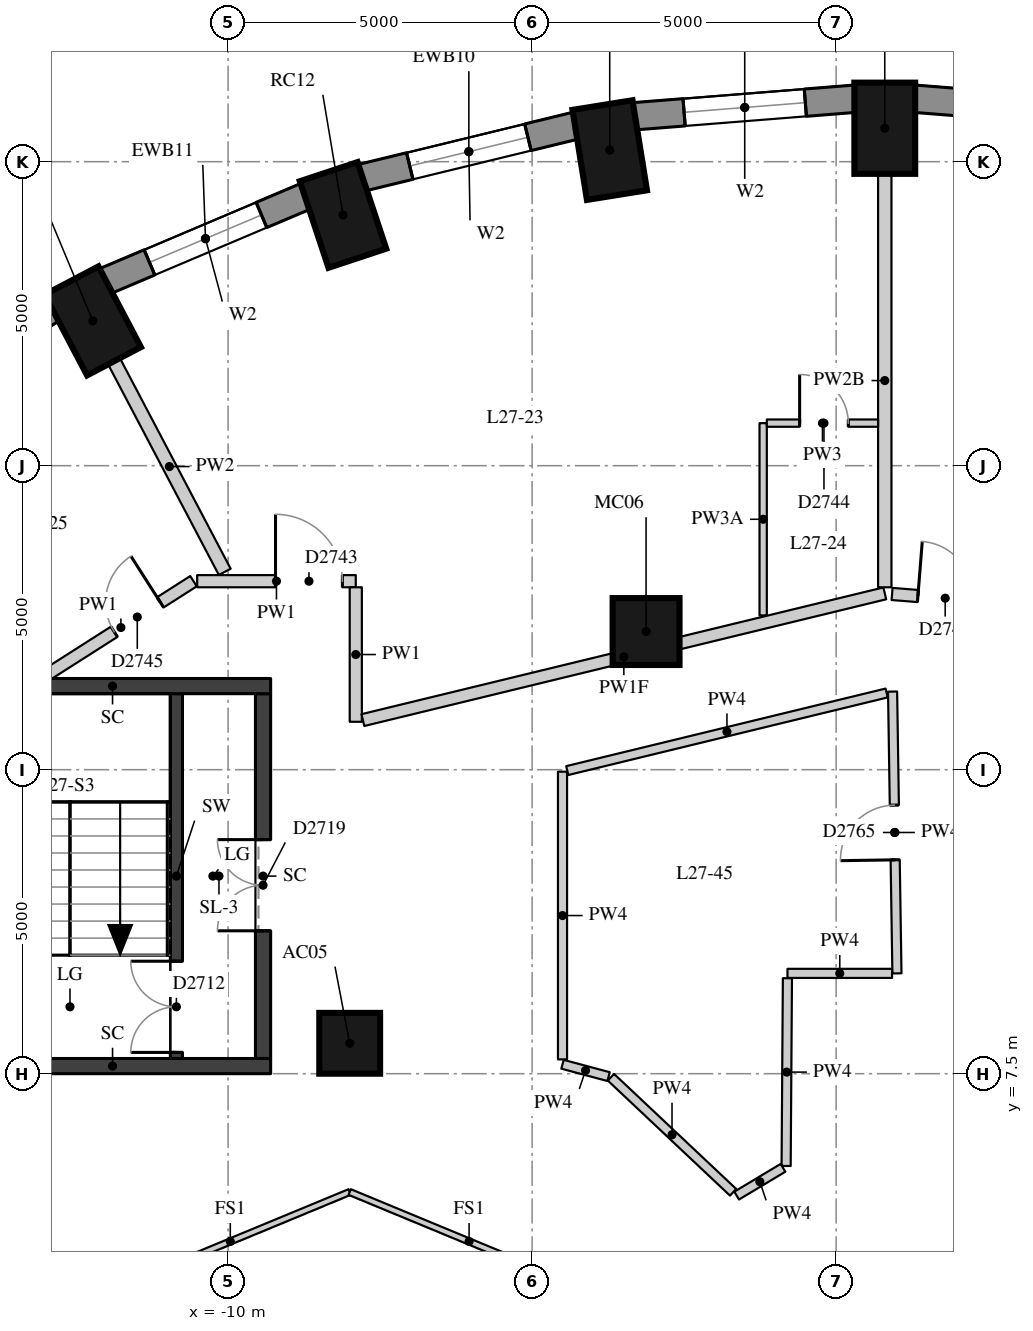
"""IFC4 building model, lengths in metres.
Left out: names, types, materials, properties, quantities, classifications, styles, units other than length and angle.
Written with IfcOpenShell. Run it as: python <this file> out.ifc"""

import sys

from ifc_helpers import new_model, si_unit, direction, frame, frame_2d, origin, origin_2d, place, context, subcontext, project, spatial, rectangle, extrude, element, fill, save


model = new_model("IFC4")
c1 = context("Model", 3, precision=1e-05, world=origin(), true_north=direction((0.0, 1.0)))
c2 = subcontext(c1, "Body", "Model", "MODEL_VIEW")
j1 = project(units=[si_unit("LENGTHUNIT", "METRE"), si_unit("PLANEANGLEUNIT", "RADIAN")], contexts=[c1])
p1 = place(None, origin())
s1 = spatial("IfcSite", under=j1, at=p1, CompositionType="ELEMENT")
p2 = place(p1, origin())
s2 = spatial("IfcBuilding", under=s1, at=p2, CompositionType="ELEMENT")
p3 = place(p2, frame((0.0, 0.0, 98.8)))
s3 = spatial("IfcBuildingStorey", under=s2, at=p3, CompositionType="ELEMENT", Elevation=98.8)
for number, where, z_axis, x_axis in (
    (1, (0.8, 23.05, 0.0), (0.0, 0.0, 1.0), (0.0, 1.0, 0.0)),
    (2, (-3.724, 22.691, 0.0), (0.0, 0.0, 1.0), (-0.159, 0.987, 0.0)),
    (3, (-8.11, 21.624, 0.0), (0.0, 0.0, 1.0), (-0.315, 0.949, 0.0)),
    (4, (-12.225, 19.882, 0.0), (0.0, 0.0, 1.0), (-0.465, 0.885, 0.0)),
):
    element("IfcColumn", number, at=place(p3, frame(where, z_axis=z_axis, x_axis=x_axis)), inside=s3, PredefinedType="COLUMN", context=c2, shape_type="SweptSolid", body=[
        extrude(rectangle(XDim=1.5, YDim=1.0, at=origin_2d()), origin(), (0.0, 0.0, 1.0), 3.3),
    ])
p4 = place(p3, frame((-8.0, 8.0, 0.0), z_axis=(0.0, 0.0, 1.0), x_axis=(1.0, 0.0, 0.0)))
e5 = element("IfcColumn", 5, at=p4, inside=s3, PredefinedType="COLUMN", context=c2, shape_type="SweptSolid", body=[
    extrude(rectangle(XDim=1.0, YDim=1.0, at=origin_2d()), origin(), (0.0, 0.0, 1.0), 3.3),
])
p5 = place(p3, frame((-3.126, 14.772, 0.0), z_axis=(0.0, 0.0, 1.0), x_axis=(1.0, 0.0, 0.0)))
e6 = element("IfcColumn", 6, at=p5, inside=s3, PredefinedType="COLUMN", context=c2, shape_type="SweptSolid", body=[
    extrude(rectangle(XDim=1.1, YDim=1.1, at=origin_2d()), origin(), (0.0, 0.0, 1.0), 3.3),
])
p6 = place(p3, frame((4.927, 23.247, 0.0), z_axis=(0.0, 0.0, 1.0), x_axis=(-0.996862216754, 0.079156306178, 0.0)))
e7 = element("IfcWall", 7, at=p6, inside=s3, PredefinedType="SOLIDWALL", context=c2, shape_type="SweptSolid", body=[
    extrude(rectangle(XDim=3.658, YDim=0.45, at=frame_2d((1.829, 0.0))), origin(), (0.0, 0.0, 1.0), 3.02),
])
p7 = place(p6, frame((0.829, 0.0, 0.4)))
e8 = element("IfcOpeningElement", 8, at=p7, cuts=e7, PredefinedType="OPENING", context=c2, shape_type="SweptSolid", body=[
    extrude(rectangle(XDim=2.0, YDim=1.75, at=frame_2d((1.0, 0.875))), frame((0.0, 0.235, 0.0), z_axis=(0.0, -1.0, 0.0), x_axis=(1.0, 0.0, 0.0)), (0.0, 0.0, 1.0), 0.47),
])
p8 = place(p3, frame((0.32, 23.536, 0.0), z_axis=(0.0, 0.0, 1.0), x_axis=(-0.996862216754, -0.079156306178, 0.0)))
e9 = element("IfcWall", 9, at=p8, inside=s3, PredefinedType="SOLIDWALL", context=c2, shape_type="SweptSolid", body=[
    extrude(rectangle(XDim=3.658, YDim=0.45, at=frame_2d((1.829, 0.0))), origin(), (0.0, 0.0, 1.0), 3.02),
])
p9 = place(p8, frame((0.829, 0.0, 0.4)))
e10 = element("IfcOpeningElement", 10, at=p9, cuts=e9, PredefinedType="OPENING", context=c2, shape_type="SweptSolid", body=[
    extrude(rectangle(XDim=2.0, YDim=1.75, at=frame_2d((1.0, 0.875))), frame((0.0, 0.235, 0.0), z_axis=(0.0, -1.0, 0.0), x_axis=(1.0, 0.0, 0.0)), (0.0, 0.0, 1.0), 0.47),
])
p10 = place(p3, frame((-4.275, 23.094, 0.0), z_axis=(0.0, 0.0, 1.0), x_axis=(-0.971667603162, -0.236351579148, 0.0)))
e11 = element("IfcWall", 11, at=p10, inside=s3, PredefinedType="SOLIDWALL", context=c2, shape_type="SweptSolid", body=[
    extrude(rectangle(XDim=3.635, YDim=0.45, at=frame_2d((1.817, 0.0))), origin(), (0.0, 0.0, 1.0), 3.02),
])
p11 = place(p10, frame((0.817, 0.0, 0.4)))
e12 = element("IfcOpeningElement", 12, at=p11, cuts=e11, PredefinedType="OPENING", context=c2, shape_type="SweptSolid", body=[
    extrude(rectangle(XDim=2.0, YDim=1.75, at=frame_2d((1.0, 0.875))), frame((0.0, 0.235, 0.0), z_axis=(0.0, -1.0, 0.0), x_axis=(1.0, 0.0, 0.0)), (0.0, 0.0, 1.0), 0.47),
])
p12 = place(p3, frame((-8.718, 21.934, 0.0), z_axis=(0.0, 0.0, 1.0), x_axis=(-0.920879975612, -0.389846213932, 0.0)))
e13 = element("IfcWall", 13, at=p12, inside=s3, PredefinedType="SOLIDWALL", context=c2, shape_type="SweptSolid", body=[
    extrude(rectangle(XDim=3.592, YDim=0.45, at=frame_2d((1.796, 0.0))), origin(), (0.0, 0.0, 1.0), 3.02),
])
p13 = place(p12, frame((0.796, 0.0, 0.4)))
e14 = element("IfcOpeningElement", 14, at=p13, cuts=e13, PredefinedType="OPENING", context=c2, shape_type="SweptSolid", body=[
    extrude(rectangle(XDim=2.0, YDim=1.75, at=frame_2d((1.0, 0.875))), frame((0.0, 0.235, 0.0), z_axis=(0.0, -1.0, 0.0), x_axis=(1.0, 0.0, 0.0)), (0.0, 0.0, 1.0), 0.47),
])
p14 = place(p3, frame((-12.875, 20.087, 0.0), z_axis=(0.0, 0.0, 1.0), x_axis=(-0.843860651879, -0.536562391722, 0.0)))
e15 = element("IfcWall", 15, at=p14, inside=s3, PredefinedType="SOLIDWALL", context=c2, shape_type="SweptSolid", body=[
    extrude(rectangle(XDim=3.532, YDim=0.45, at=frame_2d((1.766, 0.0))), origin(), (0.0, 0.0, 1.0), 3.02),
])
p15 = place(p14, frame((0.766, 0.0, 0.4)))
e16 = element("IfcOpeningElement", 16, at=p15, cuts=e15, PredefinedType="OPENING", context=c2, shape_type="SweptSolid", body=[
    extrude(rectangle(XDim=2.0, YDim=1.75, at=frame_2d((1.0, 0.875))), frame((0.0, 0.235, 0.0), z_axis=(0.0, -1.0, 0.0), x_axis=(1.0, 0.0, 0.0)), (0.0, 0.0, 1.0), 0.47),
])
p16 = place(p3, frame((-10.85, 7.75, 0.0), z_axis=(0.0, 0.0, 1.0), x_axis=(0.0, 1.0, 0.0)))
e17 = element("IfcWall", 17, at=p16, inside=s3, PredefinedType="SHEAR", context=c2, shape_type="SweptSolid", body=[
    extrude(rectangle(XDim=6.0, YDim=0.2, at=frame_2d((3.0, 0.0))), origin(), (0.0, 0.0, 1.0), 3.02),
])
p17 = place(p16, frame((0.1, 0.0, 0.0)))
e18 = element("IfcOpeningElement", 18, at=p17, cuts=e17, PredefinedType="OPENING", context=c2, shape_type="SweptSolid", body=[
    extrude(rectangle(XDim=1.5, YDim=2.1, at=frame_2d((0.75, 1.05))), frame((0.0, 0.11, 0.0), z_axis=(0.0, -1.0, 0.0), x_axis=(1.0, 0.0, 0.0)), (0.0, 0.0, 1.0), 0.22),
])
p18 = place(p3, frame((-9.425, 7.75, -0.28), z_axis=(0.0, 0.0, 1.0), x_axis=(0.0, 1.0, 0.0)))
e19 = element("IfcWall", 19, at=p18, inside=s3, PredefinedType="SHEAR", context=c2, shape_type="SweptSolid", body=[
    extrude(rectangle(XDim=6.0, YDim=0.25, at=frame_2d((3.0, 0.0))), origin(), (0.0, 0.0, 1.0), 3.3),
])
p19 = place(p18, frame((2.1, 0.0, 0.28)))
e20 = element("IfcOpeningElement", 20, at=p19, cuts=e19, PredefinedType="OPENING", context=c2, shape_type="SweptSolid", body=[
    extrude(rectangle(XDim=1.5, YDim=2.1, at=frame_2d((0.75, 1.05))), frame((0.0, 0.135, 0.0), z_axis=(0.0, -1.0, 0.0), x_axis=(1.0, 0.0, 0.0)), (0.0, 0.0, 1.0), 0.27),
])
for number, where, z_axis, x_axis in (
    (21, (-14.5, 13.875, -0.28), (0.0, 0.0, 1.0), (1.0, 0.0, 0.0)),
    (22, (-14.5, 7.625, -0.28), (0.0, 0.0, 1.0), (1.0, 0.0, 0.0)),
):
    element("IfcWall", number, at=place(p3, frame(where, z_axis=z_axis, x_axis=x_axis)), inside=s3, PredefinedType="SHEAR", context=c2, shape_type="SweptSolid", body=[
        extrude(rectangle(XDim=5.2, YDim=0.25, at=frame_2d((2.6, 0.0))), origin(), (0.0, 0.0, 1.0), 3.3),
    ])
p20 = place(p3, frame((-12.957, 14.077, 0.0), z_axis=(0.0, 0.0, 1.0), x_axis=(0.84319985174, 0.537600232538, 0.0)))
e23 = element("IfcWall", 23, at=p20, inside=s3, PredefinedType="PARTITIONING", context=c2, shape_type="SweptSolid", body=[
    extrude(rectangle(XDim=2.833, YDim=0.2, at=frame_2d((1.417, 0.0))), origin(), (0.0, 0.0, 1.0), 3.02),
])
p21 = place(p20, frame((1.286, 0.0, 0.0)))
e24 = element("IfcOpeningElement", 24, at=p21, cuts=e23, PredefinedType="OPENING", context=c2, shape_type="SweptSolid", body=[
    extrude(rectangle(XDim=0.9, YDim=2.1, at=frame_2d((0.45, 1.05))), frame((0.0, 0.11, 0.0), z_axis=(0.0, -1.0, 0.0), x_axis=(1.0, 0.0, 0.0)), (0.0, 0.0, 1.0), 0.22),
])
p22 = place(p3, frame((-10.509, 15.6, 0.0), z_axis=(0.0, 0.0, 1.0), x_axis=(1.0, 0.0, 0.0)))
e25 = element("IfcWall", 25, at=p22, inside=s3, PredefinedType="PARTITIONING", context=c2, shape_type="SweptSolid", body=[
    extrude(rectangle(XDim=2.609, YDim=0.2, at=frame_2d((1.304, 0.0))), origin(), (0.0, 0.0, 1.0), 3.02),
])
p23 = place(p22, frame((1.289, 0.0, 0.0)))
e26 = element("IfcOpeningElement", 26, at=p23, cuts=e25, PredefinedType="OPENING", context=c2, shape_type="SweptSolid", body=[
    extrude(rectangle(XDim=1.1, YDim=2.1, at=frame_2d((0.55, 1.05))), frame((0.0, 0.11, 0.0), z_axis=(0.0, -1.0, 0.0), x_axis=(1.0, 0.0, 0.0)), (0.0, 0.0, 1.0), 0.22),
])
p24 = place(p3, frame((-7.9, 15.5, 0.0), z_axis=(0.0, 0.0, 1.0), x_axis=(0.0, -1.0, 0.0)))
e27 = element("IfcWall", 27, at=p24, inside=s3, PredefinedType="PARTITIONING", context=c2, shape_type="SweptSolid", body=[
    extrude(rectangle(XDim=2.212, YDim=0.2, at=frame_2d((1.106, 0.0))), origin(), (0.0, 0.0, 1.0), 3.02),
])
p25 = place(p3, frame((-7.783, 13.316, 0.0), z_axis=(0.0, 0.0, 1.0), x_axis=(0.971757778997, 0.23598054784, 0.0)))
e28 = element("IfcWall", 28, at=p25, inside=s3, PredefinedType="PARTITIONING", context=c2, shape_type="SweptSolid", body=[
    extrude(rectangle(XDim=8.832, YDim=0.2, at=frame_2d((4.416, 0.0))), origin(), (0.0, 0.0, 1.0), 2.42),
])
p26 = place(p3, frame((0.92, 15.39, 0.0), z_axis=(0.0, 0.0, 1.0), x_axis=(0.996853106713, -0.07927095077, 0.0)))
e29 = element("IfcWall", 29, at=p26, inside=s3, PredefinedType="PARTITIONING", context=c2, shape_type="SweptSolid", body=[
    extrude(rectangle(XDim=3.212, YDim=0.2, at=frame_2d((1.606, 0.0))), origin(), (0.0, 0.0, 1.0), 2.42),
])
p27 = place(p26, frame((0.427, 0.0, 0.0)))
e30 = element("IfcOpeningElement", 30, at=p27, cuts=e29, PredefinedType="OPENING", context=c2, shape_type="SweptSolid", body=[
    extrude(rectangle(XDim=0.9, YDim=2.1, at=frame_2d((0.45, 1.05))), frame((0.0, 0.11, 0.0), z_axis=(0.0, -1.0, 0.0), x_axis=(1.0, 0.0, 0.0)), (0.0, 0.0, 1.0), 0.22),
])
p28 = place(p3, frame((0.928, 13.785, 0.0), z_axis=(0.0, 0.0, 1.0), x_axis=(0.015432211783, -0.999880916329, 0.0)))
e31 = element("IfcWall", 31, at=p28, inside=s3, PredefinedType="PARTITIONING", context=c2, shape_type="SweptSolid", body=[
    extrude(rectangle(XDim=4.635, YDim=0.15, at=frame_2d((2.318, 0.0))), origin(), (0.0, 0.0, 1.0), 3.02),
])
p29 = place(p28, frame((1.868, 0.0, 0.0)))
e32 = element("IfcOpeningElement", 32, at=p29, cuts=e31, PredefinedType="OPENING", context=c2, shape_type="SweptSolid", body=[
    extrude(rectangle(XDim=0.9, YDim=2.1, at=frame_2d((0.45, 1.05))), frame((0.0, 0.085, 0.0), z_axis=(0.0, -1.0, 0.0), x_axis=(1.0, 0.0, 0.0)), (0.0, 0.0, 1.0), 0.17),
])
p30 = place(p3, frame((0.92, 9.15, 0.0), z_axis=(0.0, 0.0, 1.0), x_axis=(-1.0, 0.0, 0.0)))
e33 = element("IfcWall", 33, at=p30, inside=s3, PredefinedType="PARTITIONING", context=c2, shape_type="SweptSolid", body=[
    extrude(rectangle(XDim=1.72, YDim=0.15, at=frame_2d((0.86, 0.0))), origin(), (0.0, 0.0, 1.0), 3.02),
])
p31 = place(p3, frame((-0.801, 9.07, 0.0), z_axis=(0.0, 0.0, 1.0), x_axis=(-0.006879482938, -0.999976336077, 0.0)))
e34 = element("IfcWall", 34, at=p31, inside=s3, PredefinedType="PARTITIONING", context=c2, shape_type="SweptSolid", body=[
    extrude(rectangle(XDim=3.087, YDim=0.15, at=frame_2d((1.544, 0.0))), origin(), (0.0, 0.0, 1.0), 3.02),
])
p32 = place(p3, frame((-0.874, 5.952, 0.0), z_axis=(0.0, 0.0, 1.0), x_axis=(-0.857759476535, -0.514051242984, 0.0)))
e35 = element("IfcWall", 35, at=p32, inside=s3, PredefinedType="PARTITIONING", context=c2, shape_type="SweptSolid", body=[
    extrude(rectangle(XDim=0.889, YDim=0.15, at=frame_2d((0.444, 0.0))), origin(), (0.0, 0.0, 1.0), 3.02),
])
p33 = place(p3, frame((-1.694, 5.55, 0.0), z_axis=(0.0, 0.0, 1.0), x_axis=(-0.728018179622, 0.685557824067, 0.0)))
e36 = element("IfcWall", 36, at=p33, inside=s3, PredefinedType="PARTITIONING", context=c2, shape_type="SweptSolid", body=[
    extrude(rectangle(XDim=2.76, YDim=0.15, at=frame_2d((1.38, 0.0))), origin(), (0.0, 0.0, 1.0), 3.02),
])
p34 = place(p3, frame((-3.742, 7.452, 0.0), z_axis=(0.0, 0.0, 1.0), x_axis=(-0.965903596155, 0.258901994846, 0.0)))
e37 = element("IfcWall", 37, at=p34, inside=s3, PredefinedType="PARTITIONING", context=c2, shape_type="SweptSolid", body=[
    extrude(rectangle(XDim=0.785, YDim=0.15, at=frame_2d((0.392, 0.0))), origin(), (0.0, 0.0, 1.0), 3.02),
])
p35 = place(p3, frame((-4.5, 7.735, 0.0), z_axis=(0.0, 0.0, 1.0), x_axis=(0.0, 1.0, 0.0)))
e38 = element("IfcWall", 38, at=p35, inside=s3, PredefinedType="PARTITIONING", context=c2, shape_type="SweptSolid", body=[
    extrude(rectangle(XDim=4.732, YDim=0.15, at=frame_2d((2.366, 0.0))), origin(), (0.0, 0.0, 1.0), 3.02),
])
p36 = place(p3, frame((-4.422, 12.485, 0.0), z_axis=(0.0, 0.0, 1.0), x_axis=(0.971733724628, 0.236079580694, 0.0)))
e39 = element("IfcWall", 39, at=p36, inside=s3, PredefinedType="PARTITIONING", context=c2, shape_type="SweptSolid", body=[
    extrude(rectangle(XDim=5.406, YDim=0.15, at=frame_2d((2.703, 0.0))), origin(), (0.0, 0.0, 1.0), 3.02),
])
p37 = place(p3, frame((0.8, 22.3, 0.0), z_axis=(0.0, 0.0, 1.0), x_axis=(0.0, -1.0, 0.0)))
e40 = element("IfcWall", 40, at=p37, inside=s3, PredefinedType="PARTITIONING", context=c2, shape_type="SweptSolid", body=[
    extrude(rectangle(XDim=6.8, YDim=0.22, at=frame_2d((3.4, 0.0))), origin(), (0.0, 0.0, 1.0), 2.57),
])
p38 = place(p3, frame((-11.876, 19.218, 0.0), z_axis=(0.0, 0.0, 1.0), x_axis=(0.465386433174, -0.885107602395, 0.0)))
e41 = element("IfcWall", 41, at=p38, inside=s3, PredefinedType="PARTITIONING", context=c2, shape_type="SweptSolid", body=[
    extrude(rectangle(XDim=3.914, YDim=0.22, at=frame_2d((1.957, 0.0))), origin(), (0.0, 0.0, 1.0), 3.02),
])
p39 = place(p3, frame((-1.2, 15.037, 0.0), z_axis=(0.0, 0.0, 1.0), x_axis=(0.0, 1.0, 0.0)))
e42 = element("IfcWall", 42, at=p39, inside=s3, PredefinedType="PARTITIONING", context=c2, shape_type="SweptSolid", body=[
    extrude(rectangle(XDim=3.163, YDim=0.12, at=frame_2d((1.581, 0.0))), origin(), (0.0, 0.0, 1.0), 2.57),
])
p40 = place(p3, frame((-1.14, 18.2, 0.0), z_axis=(0.0, 0.0, 1.0), x_axis=(1.0, 0.0, 0.0)))
e43 = element("IfcWall", 43, at=p40, inside=s3, PredefinedType="PARTITIONING", context=c2, shape_type="SweptSolid", body=[
    extrude(rectangle(XDim=1.83, YDim=0.12, at=frame_2d((0.915, 0.0))), origin(), (0.0, 0.0, 1.0), 3.02),
])
p41 = place(p40, frame((0.54, 0.0, 0.0)))
e44 = element("IfcOpeningElement", 44, at=p41, cuts=e43, PredefinedType="OPENING", context=c2, shape_type="SweptSolid", body=[
    extrude(rectangle(XDim=0.8, YDim=2.1, at=frame_2d((0.4, 1.05))), frame((0.0, 0.07, 0.0), z_axis=(0.0, -1.0, 0.0), x_axis=(1.0, 0.0, 0.0)), (0.0, 0.0, 1.0), 0.14),
])
for number, where, z_axis, x_axis in (
    (45, (-11.927, 3.927, 0.0), (0.0, 0.0, 1.0), (0.924, 0.383, 0.0)),
    (46, (-8.0, 5.554, 0.0), (0.0, 0.0, 1.0), (0.924, -0.383, 0.0)),
):
    element("IfcWall", number, at=place(p3, frame(where, z_axis=z_axis, x_axis=x_axis)), inside=s3, PredefinedType="PARTITIONING", context=c2, shape_type="SweptSolid", body=[
        extrude(rectangle(XDim=4.251, YDim=0.1, at=frame_2d((2.125, 0.0))), origin(), (0.0, 0.0, 1.0), 3.02),
    ])
p42 = place(p9, origin())
e47 = element("IfcWindow", 47, at=p42, inside=s3, PartitioningType="SINGLE_PANEL", PredefinedType="WINDOW", context=c2, shape_type="SweptSolid", body=[
    extrude(rectangle(XDim=2.0, YDim=1.75, at=frame_2d((1.0, 0.875))), frame((0.0, 0.035, 0.0), z_axis=(0.0, -1.0, 0.0), x_axis=(1.0, 0.0, 0.0)), (0.0, 0.0, 1.0), 0.06),
])
fill(e10, e47)
p43 = place(p11, origin())
e48 = element("IfcWindow", 48, at=p43, inside=s3, PartitioningType="SINGLE_PANEL", PredefinedType="WINDOW", context=c2, shape_type="SweptSolid", body=[
    extrude(rectangle(XDim=2.0, YDim=1.75, at=frame_2d((1.0, 0.875))), frame((0.0, 0.035, 0.0), z_axis=(0.0, -1.0, 0.0), x_axis=(1.0, 0.0, 0.0)), (0.0, 0.0, 1.0), 0.06),
])
fill(e12, e48)
p44 = place(p13, origin())
e49 = element("IfcWindow", 49, at=p44, inside=s3, PartitioningType="SINGLE_PANEL", PredefinedType="WINDOW", context=c2, shape_type="SweptSolid", body=[
    extrude(rectangle(XDim=2.0, YDim=1.75, at=frame_2d((1.0, 0.875))), frame((0.0, 0.035, 0.0), z_axis=(0.0, -1.0, 0.0), x_axis=(1.0, 0.0, 0.0)), (0.0, 0.0, 1.0), 0.06),
])
fill(e14, e49)
p45 = place(p17, origin())
e50 = element("IfcDoor", 50, at=p45, inside=s3, OperationType="DOUBLE_DOOR_SINGLE_SWING", PredefinedType="DOOR", context=c2, shape_type="SweptSolid", body=[
    extrude(rectangle(XDim=1.5, YDim=2.1, at=frame_2d((0.75, 1.05))), frame((0.0, 0.025, 0.0), z_axis=(0.0, -1.0, 0.0), x_axis=(1.0, 0.0, 0.0)), (0.0, 0.0, 1.0), 0.05),
])
fill(e18, e50)
p46 = place(p19, origin())
e51 = element("IfcDoor", 51, at=p46, inside=s3, OperationType="DOUBLE_DOOR_SINGLE_SWING", PredefinedType="DOOR", context=c2, shape_type="SweptSolid", body=[
    extrude(rectangle(XDim=1.5, YDim=2.1, at=frame_2d((0.75, 1.05))), frame((0.0, 0.025, 0.0), z_axis=(0.0, -1.0, 0.0), x_axis=(1.0, 0.0, 0.0)), (0.0, 0.0, 1.0), 0.05),
])
fill(e20, e51)
p47 = place(p27, origin())
e52 = element("IfcDoor", 52, at=p47, inside=s3, OperationType="SINGLE_SWING_LEFT", PredefinedType="DOOR", context=c2, shape_type="SweptSolid", body=[
    extrude(rectangle(XDim=0.9, YDim=2.1, at=frame_2d((0.45, 1.05))), frame((0.0, 0.025, 0.0), z_axis=(0.0, -1.0, 0.0), x_axis=(1.0, 0.0, 0.0)), (0.0, 0.0, 1.0), 0.05),
])
fill(e30, e52)
p48 = place(p23, origin())
e53 = element("IfcDoor", 53, at=p48, inside=s3, OperationType="SINGLE_SWING_LEFT", PredefinedType="DOOR", context=c2, shape_type="SweptSolid", body=[
    extrude(rectangle(XDim=1.1, YDim=2.1, at=frame_2d((0.55, 1.05))), frame((0.0, 0.025, 0.0), z_axis=(0.0, -1.0, 0.0), x_axis=(1.0, 0.0, 0.0)), (0.0, 0.0, 1.0), 0.05),
])
fill(e26, e53)
p49 = place(p41, origin())
e54 = element("IfcDoor", 54, at=p49, inside=s3, OperationType="SINGLE_SWING_LEFT", PredefinedType="DOOR", context=c2, shape_type="SweptSolid", body=[
    extrude(rectangle(XDim=0.8, YDim=2.1, at=frame_2d((0.4, 1.05))), frame((0.0, 0.025, 0.0), z_axis=(0.0, -1.0, 0.0), x_axis=(1.0, 0.0, 0.0)), (0.0, 0.0, 1.0), 0.05),
])
fill(e44, e54)
p50 = place(p21, origin())
e55 = element("IfcDoor", 55, at=p50, inside=s3, OperationType="SINGLE_SWING_RIGHT", PredefinedType="DOOR", context=c2, shape_type="SweptSolid", body=[
    extrude(rectangle(XDim=0.9, YDim=2.1, at=frame_2d((0.45, 1.05))), frame((0.0, 0.025, 0.0), z_axis=(0.0, -1.0, 0.0), x_axis=(1.0, 0.0, 0.0)), (0.0, 0.0, 1.0), 0.05),
])
fill(e24, e55)
p51 = place(p29, origin())
e56 = element("IfcDoor", 56, at=p51, inside=s3, OperationType="SINGLE_SWING_LEFT", PredefinedType="DOOR", context=c2, shape_type="SweptSolid", body=[
    extrude(rectangle(XDim=0.9, YDim=2.1, at=frame_2d((0.45, 1.05))), frame((0.0, 0.025, 0.0), z_axis=(0.0, -1.0, 0.0), x_axis=(1.0, 0.0, 0.0)), (0.0, 0.0, 1.0), 0.05),
])
fill(e32, e56)
save(model, sys.argv[1])
